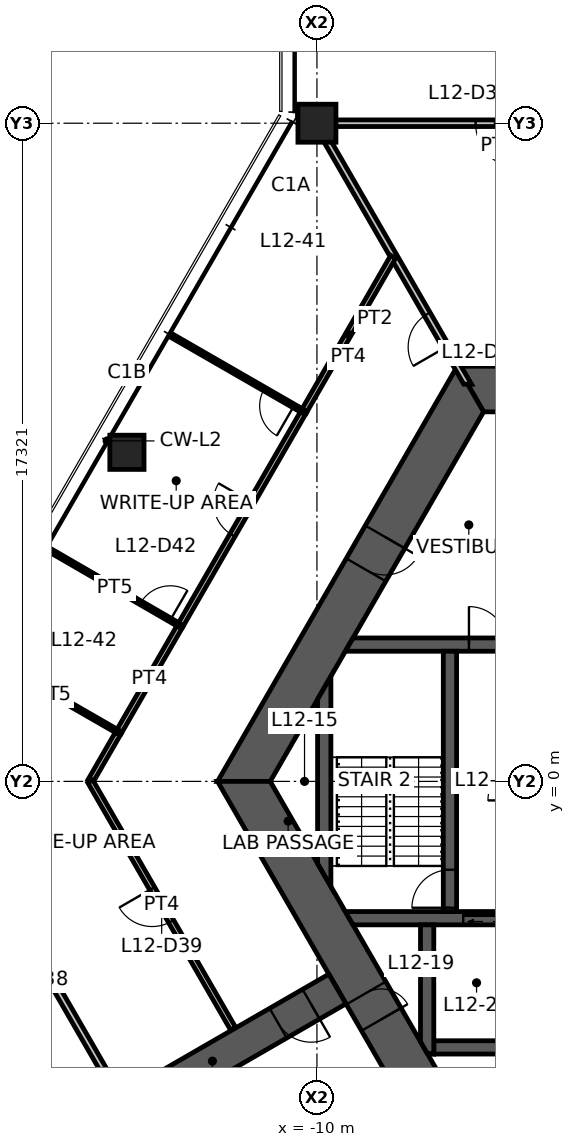
"""IFC4 building model, lengths in metres.
Left out: names, types, materials, properties, quantities, classifications, styles, units other than length and angle.
Written with IfcOpenShell. Run it as: python <this file> out.ifc"""

import sys

from ifc_helpers import new_model, si_unit, direction, frame, frame_2d, origin, origin_2d, place, context, subcontext, project, spatial, polyline, rectangle, hollow_rectangle, outline, extrude, element, fill, save


model = new_model("IFC4")
c1 = context("Model", 3, precision=1e-05, world=origin(), true_north=direction((0.0, 1.0)))
c2 = subcontext(c1, "Body", "Model", "MODEL_VIEW")
j1 = project(units=[si_unit("LENGTHUNIT", "METRE"), si_unit("PLANEANGLEUNIT", "RADIAN")], contexts=[c1])
p1 = place(None, origin())
s1 = spatial("IfcSite", under=j1, at=p1, CompositionType="ELEMENT")
p2 = place(p1, origin())
s2 = spatial("IfcBuilding", under=s1, at=p2, CompositionType="ELEMENT")
p3 = place(p2, frame((0.0, 0.0, 47.8)))
s3 = spatial("IfcBuildingStorey", under=s2, at=p3, CompositionType="ELEMENT", Elevation=47.8)
p4 = place(p3, frame((-10.0, 17.321, 0.0), z_axis=(0.0, 0.0, 1.0), x_axis=(1.0, 0.0, 0.0)))
e1 = element("IfcColumn", 1, at=p4, inside=s3, PredefinedType="COLUMN", context=c2, shape_type="SweptSolid", body=[
    extrude(hollow_rectangle(XDim=1.0, YDim=1.0, WallThickness=0.06, at=origin_2d()), origin(), (0.0, 0.0, 1.0), 4.2),
])
p5 = place(p3, frame((-15.0, 8.66, 0.0), z_axis=(0.0, 0.0, 1.0), x_axis=(1.0, 0.0, 0.0)))
e2 = element("IfcColumn", 2, at=p5, inside=s3, PredefinedType="COLUMN", context=c2, shape_type="SweptSolid", body=[
    extrude(hollow_rectangle(XDim=0.9, YDim=0.9, WallThickness=0.05, at=origin_2d()), origin(), (0.0, 0.0, 1.0), 4.2),
])
p6 = place(p3, frame((5.961, 10.325, 0.0), z_axis=(0.0, 0.0, 1.0), x_axis=(-1.0, 0.0, 0.0)))
e3 = element("IfcWall", 3, at=p6, inside=s3, PredefinedType="SHEAR", context=c2, shape_type="SweptSolid", body=[
    extrude(outline(polyline([(-0.346, -0.6), (4.574, -0.6), (5.474, -0.6), (6.449, -0.6), (7.349, -0.6), (12.269, -0.6), (11.576, 0.6), (7.349, 0.6), (6.449, 0.6), (5.474, 0.6), (4.574, 0.6), (0.346, 0.6), (-0.346, -0.6)])), origin(), (0.0, 0.0, 1.0), 4.2),
])
p7 = place(p6, frame((6.449, 0.0, 0.0)))
e4 = element("IfcOpeningElement", 4, at=p7, cuts=e3, PredefinedType="OPENING", context=c2, shape_type="SweptSolid", body=[
    extrude(rectangle(XDim=0.9, YDim=2.1, at=frame_2d((0.45, 1.05))), frame((0.0, 0.61, 0.0), z_axis=(0.0, -1.0, 0.0), x_axis=(1.0, 0.0, 0.0)), (0.0, 0.0, 1.0), 1.22),
])
p8 = place(p6, frame((4.574, 0.0, 0.0)))
e5 = element("IfcOpeningElement", 5, at=p8, cuts=e3, PredefinedType="OPENING", context=c2, shape_type="SweptSolid", body=[
    extrude(rectangle(XDim=0.9, YDim=2.1, at=frame_2d((0.45, 1.05))), frame((0.0, 0.61, 0.0), z_axis=(0.0, -1.0, 0.0), x_axis=(1.0, 0.0, 0.0)), (0.0, 0.0, 1.0), 1.22),
])
p9 = place(p3, frame((-5.961, 10.325, 0.0), z_axis=(0.0, 0.0, 1.0), x_axis=(-0.500004296715, -0.866022923061, 0.0)))
e6 = element("IfcWall", 6, at=p9, inside=s3, PredefinedType="SHEAR", context=c2, shape_type="SweptSolid", body=[
    extrude(outline(polyline([(-0.346, -0.6), (4.494, -0.6), (5.494, -0.6), (12.269, -0.6), (11.576, 0.6), (5.494, 0.6), (4.494, 0.6), (0.346, 0.6), (-0.346, -0.6)])), origin(), (0.0, 0.0, 1.0), 4.2),
])
p10 = place(p9, frame((4.494, 0.0, 0.0)))
e7 = element("IfcOpeningElement", 7, at=p10, cuts=e6, PredefinedType="OPENING", context=c2, shape_type="SweptSolid", body=[
    extrude(rectangle(XDim=1.0, YDim=2.1, at=frame_2d((0.5, 1.05))), frame((0.0, 0.61, 0.0), z_axis=(0.0, -1.0, 0.0), x_axis=(1.0, 0.0, 0.0)), (0.0, 0.0, 1.0), 1.22),
])
p11 = place(p3, frame((-11.922, 0.0, 0.0), z_axis=(0.0, 0.0, 1.0), x_axis=(0.500004296715, -0.866022923061, 0.0)))
e8 = element("IfcWall", 8, at=p11, inside=s3, PredefinedType="SHEAR", context=c2, shape_type="SweptSolid", body=[
    extrude(outline(polyline([(-0.346, -0.6), (6.431, -0.6), (7.231, -0.6), (12.269, -0.6), (11.576, 0.6), (7.231, 0.6), (6.431, 0.6), (0.346, 0.6), (-0.346, -0.6)])), origin(), (0.0, 0.0, 1.0), 4.2),
])
p12 = place(p11, frame((6.431, 0.0, 0.0)))
e9 = element("IfcOpeningElement", 9, at=p12, cuts=e8, PredefinedType="OPENING", context=c2, shape_type="SweptSolid", body=[
    extrude(rectangle(XDim=0.8, YDim=2.1, at=frame_2d((0.4, 1.05))), frame((0.0, 0.61, 0.0), z_axis=(0.0, -1.0, 0.0), x_axis=(1.0, 0.0, 0.0)), (0.0, 0.0, 1.0), 1.22),
])
p13 = place(p3, frame((-9.461, -5.462, 0.0), z_axis=(0.0, 0.0, 1.0), x_axis=(-0.866019116917, -0.500010889016, 0.0)))
e10 = element("IfcWall", 10, at=p13, inside=s3, PredefinedType="SHEAR", context=c2, shape_type="SweptSolid", body=[
    extrude(rectangle(XDim=7.595, YDim=0.9, at=frame_2d((3.798, 0.0))), origin(), (0.0, 0.0, 1.0), 4.2),
])
p14 = place(p13, frame((0.8, 0.0, 0.0)))
e11 = element("IfcOpeningElement", 11, at=p14, cuts=e10, PredefinedType="OPENING", context=c2, shape_type="SweptSolid", body=[
    extrude(rectangle(XDim=1.0, YDim=2.1, at=frame_2d((0.5, 1.05))), frame((0.0, 0.46, 0.0), z_axis=(0.0, -1.0, 0.0), x_axis=(1.0, 0.0, 0.0)), (0.0, 0.0, 1.0), 0.92),
])
p15 = place(p3, frame((-9.151, 3.6, 0.0), z_axis=(0.0, 0.0, 1.0), x_axis=(1.0, 0.0, 0.0)))
e12 = element("IfcWall", 12, at=p15, inside=s3, PredefinedType="SHEAR", context=c2, shape_type="SweptSolid", body=[
    extrude(outline(polyline([(-0.101, -0.175), (3.151, -0.175), (4.151, -0.175), (7.726, -0.175), (7.726, 0.175), (4.151, 0.175), (3.151, 0.175), (0.101, 0.175), (-0.101, -0.175)])), origin(), (0.0, 0.0, 1.0), 4.2),
])
p16 = place(p15, frame((3.151, 0.0, 0.0)))
e13 = element("IfcOpeningElement", 13, at=p16, cuts=e12, PredefinedType="OPENING", context=c2, shape_type="SweptSolid", body=[
    extrude(rectangle(XDim=1.0, YDim=2.1, at=frame_2d((0.5, 1.05))), frame((0.0, 0.185, 0.0), z_axis=(0.0, -1.0, 0.0), x_axis=(1.0, 0.0, 0.0)), (0.0, 0.0, 1.0), 0.37),
])
p17 = place(p3, frame((-9.151, -3.6, 0.0), z_axis=(0.0, 0.0, 1.0), x_axis=(1.0, 0.0, 0.0)))
e14 = element("IfcWall", 14, at=p17, inside=s3, PredefinedType="SHEAR", context=c2, shape_type="SweptSolid", body=[
    extrude(outline(polyline([(0.101, -0.175), (3.001, -0.175), (4.301, -0.175), (7.726, -0.175), (7.726, 0.175), (4.301, 0.175), (3.001, 0.175), (-0.101, 0.175), (0.101, -0.175)])), origin(), (0.0, 0.0, 1.0), 4.2),
])
p18 = place(p17, frame((3.001, 0.0, 0.0)))
e15 = element("IfcOpeningElement", 15, at=p18, cuts=e14, PredefinedType="OPENING", context=c2, shape_type="SweptSolid", body=[
    extrude(rectangle(XDim=1.3, YDim=2.1, at=frame_2d((0.65, 1.05))), frame((0.0, 0.185, 0.0), z_axis=(0.0, -1.0, 0.0), x_axis=(1.0, 0.0, 0.0)), (0.0, 0.0, 1.0), 0.37),
])
p19 = place(p3, frame((-6.5, -3.425, 0.0), z_axis=(0.0, 0.0, 1.0), x_axis=(0.0, 1.0, 0.0)))
e16 = element("IfcWall", 16, at=p19, inside=s3, PredefinedType="SHEAR", context=c2, shape_type="SweptSolid", body=[
    extrude(rectangle(XDim=6.85, YDim=0.35, at=frame_2d((3.425, 0.0))), origin(), (0.0, 0.0, 1.0), 4.2),
])
p20 = place(p19, frame((0.1, 0.0, 0.0)))
e17 = element("IfcOpeningElement", 17, at=p20, cuts=e16, PredefinedType="OPENING", context=c2, shape_type="SweptSolid", body=[
    extrude(rectangle(XDim=1.0, YDim=2.1, at=frame_2d((0.5, 1.05))), frame((0.0, 0.185, 0.0), z_axis=(0.0, -1.0, 0.0), x_axis=(1.0, 0.0, 0.0)), (0.0, 0.0, 1.0), 0.37),
])
p21 = place(p3, frame((-6.925, -7.0, 0.0), z_axis=(0.0, 0.0, 1.0), x_axis=(1.0, 0.0, 0.0)))
e18 = element("IfcWall", 18, at=p21, inside=s3, PredefinedType="SHEAR", context=c2, shape_type="SweptSolid", body=[
    extrude(rectangle(XDim=2.25, YDim=0.35, at=frame_2d((1.125, 0.0))), origin(), (0.0, 0.0, 1.0), 4.2),
])
p22 = place(p3, frame((-7.1, -3.775, 0.0), z_axis=(0.0, 0.0, 1.0), x_axis=(0.0, -1.0, 0.0)))
e19 = element("IfcWall", 19, at=p22, inside=s3, PredefinedType="SHEAR", context=c2, shape_type="SweptSolid", body=[
    extrude(outline(polyline([(0.0, -0.175), (3.074, -0.175), (3.377, 0.0), (3.4, 0.175), (0.0, 0.175), (0.0, -0.175)])), origin(), (0.0, 0.0, 1.0), 4.2),
])
p23 = place(p3, frame((-9.808, -2.462, 0.0), z_axis=(0.0, 0.0, 1.0), x_axis=(0.0, 1.0, 0.0)))
e20 = element("IfcWall", 20, at=p23, inside=s3, PredefinedType="SHEAR", context=c2, shape_type="SweptSolid", body=[
    extrude(outline(polyline([(-0.303, -0.175), (5.228, -0.175), (4.621, 0.175), (0.303, 0.175), (-0.303, -0.175)])), origin(), (0.0, 0.0, 1.0), 4.2),
])
p24 = place(p3, frame((-6.035, 10.453, 0.0), z_axis=(0.0, 0.0, 1.0), x_axis=(-0.499993402427, 0.866029212861, 0.0)))
e21 = element("IfcWall", 21, at=p24, inside=s3, PredefinedType="PARTITIONING", context=c2, shape_type="SweptSolid", body=[
    extrude(outline(polyline([(-0.051, -0.087), (1.129, -0.087), (2.129, -0.087), (7.93, -0.087), (7.93, 0.087), (2.129, 0.087), (1.129, 0.087), (0.051, 0.087), (-0.051, -0.087)])), origin(), (0.0, 0.0, 1.0), 3.05),
])
p25 = place(p24, frame((1.129, 0.0, 0.0)))
e22 = element("IfcOpeningElement", 22, at=p25, cuts=e21, PredefinedType="OPENING", context=c2, shape_type="SweptSolid", body=[
    extrude(rectangle(XDim=1.0, YDim=2.1, at=frame_2d((0.5, 1.05))), frame((0.0, 0.098, 0.0), z_axis=(0.0, -1.0, 0.0), x_axis=(1.0, 0.0, 0.0)), (0.0, 0.0, 1.0), 0.195),
])
p26 = place(p3, frame((-0.45, 17.321, 0.0), z_axis=(0.0, 0.0, 1.0), x_axis=(-1.0, 0.0, 0.0)))
e23 = element("IfcWall", 23, at=p26, inside=s3, PredefinedType="PARTITIONING", context=c2, shape_type="SweptSolid", body=[
    extrude(rectangle(XDim=9.55, YDim=0.175, at=frame_2d((4.775, 0.0))), origin(), (0.0, 0.0, 1.0), 2.95),
])
p27 = place(p26, frame((4.175, 0.0, 0.0)))
e24 = element("IfcOpeningElement", 24, at=p27, cuts=e23, PredefinedType="OPENING", context=c2, shape_type="SweptSolid", body=[
    extrude(rectangle(XDim=1.2, YDim=2.1, at=frame_2d((0.6, 1.05))), frame((0.0, 0.098, 0.0), z_axis=(0.0, -1.0, 0.0), x_axis=(1.0, 0.0, 0.0)), (0.0, 0.0, 1.0), 0.195),
])
p28 = place(p3, frame((-15.225, -8.271, 0.0), z_axis=(0.0, 0.0, 1.0), x_axis=(-0.499993908199, 0.866028920859, 0.0)))
e25 = element("IfcWall", 25, at=p28, inside=s3, PredefinedType="PARTITIONING", context=c2, shape_type="SweptSolid", body=[
    extrude(rectangle(XDim=9.55, YDim=0.175, at=frame_2d((4.775, 0.0))), origin(), (0.0, 0.0, 1.0), 2.95),
])
p29 = place(p28, frame((4.175, 0.0, 0.0)))
e26 = element("IfcOpeningElement", 26, at=p29, cuts=e25, PredefinedType="OPENING", context=c2, shape_type="SweptSolid", body=[
    extrude(rectangle(XDim=1.2, YDim=2.1, at=frame_2d((0.6, 1.05))), frame((0.0, 0.098, 0.0), z_axis=(0.0, -1.0, 0.0), x_axis=(1.0, 0.0, 0.0)), (0.0, 0.0, 1.0), 0.195),
])
p30 = place(p3, frame((-10.352, 9.719, 0.0), z_axis=(0.0, 0.0, 1.0), x_axis=(0.499985273446, 0.866033905998, 0.0)))
e27 = element("IfcWall", 27, at=p30, inside=s3, PredefinedType="PARTITIONING", context=c2, shape_type="SweptSolid", body=[
    extrude(rectangle(XDim=4.718, YDim=0.15, at=frame_2d((2.359, 0.0))), origin(), (0.0, 0.0, 1.0), 2.65),
])
p31 = place(p3, frame((-15.222, 1.285, 0.0), z_axis=(0.0, 0.0, 1.0), x_axis=(0.499969057507, 0.866043267704, 0.0)))
e28 = element("IfcWall", 28, at=p31, inside=s3, PredefinedType="PARTITIONING", context=c2, shape_type="SweptSolid", body=[
    extrude(rectangle(XDim=3.257, YDim=0.15, at=frame_2d((1.628, 0.0))), origin(), (0.0, 0.0, 1.0), 2.65),
])
p32 = place(p3, frame((-15.964, 0.0, 0.0), z_axis=(0.0, 0.0, 1.0), x_axis=(0.499901701094, 0.866082149246, 0.0)))
e29 = element("IfcWall", 29, at=p32, inside=s3, PredefinedType="PARTITIONING", context=c2, shape_type="SweptSolid", body=[
    extrude(rectangle(XDim=1.493, YDim=0.15, at=frame_2d((0.747, 0.0))), origin(), (0.0, 0.0, 1.0), 2.65),
])
p33 = place(p3, frame((-12.208, -6.506, 0.0), z_axis=(0.0, 0.0, 1.0), x_axis=(-0.499984092097, 0.866034588021, 0.0)))
e30 = element("IfcWall", 30, at=p33, inside=s3, PredefinedType="PARTITIONING", context=c2, shape_type="SweptSolid", body=[
    extrude(rectangle(XDim=7.512, YDim=0.15, at=frame_2d((3.756, 0.0))), origin(), (0.0, 0.0, 1.0), 2.65),
])
p34 = place(p33, frame((3.256, 0.0, 0.0)))
e31 = element("IfcOpeningElement", 31, at=p34, cuts=e30, PredefinedType="OPENING", context=c2, shape_type="SweptSolid", body=[
    extrude(rectangle(XDim=1.0, YDim=2.1, at=frame_2d((0.5, 1.05))), frame((0.0, 0.085, 0.0), z_axis=(0.0, -1.0, 0.0), x_axis=(1.0, 0.0, 0.0)), (0.0, 0.0, 1.0), 0.17),
])
p35 = place(p3, frame((-13.598, 4.097, 0.0), z_axis=(0.0, 0.0, 1.0), x_axis=(0.49998791073, 0.866032383415, 0.0)))
e32 = element("IfcWall", 32, at=p35, inside=s3, PredefinedType="PARTITIONING", context=c2, shape_type="SweptSolid", body=[
    extrude(rectangle(XDim=6.502, YDim=0.15, at=frame_2d((3.251, 0.0))), origin(), (0.0, 0.0, 1.0), 2.65),
])
p36 = place(p35, frame((2.751, 0.0, 0.0)))
e33 = element("IfcOpeningElement", 33, at=p36, cuts=e32, PredefinedType="OPENING", context=c2, shape_type="SweptSolid", body=[
    extrude(rectangle(XDim=1.0, YDim=2.1, at=frame_2d((0.5, 1.05))), frame((0.0, 0.085, 0.0), z_axis=(0.0, -1.0, 0.0), x_axis=(1.0, 0.0, 0.0)), (0.0, 0.0, 1.0), 0.17),
])
p37 = place(p3, frame((-10.347, 9.728, 0.0), z_axis=(0.0, 0.0, 1.0), x_axis=(-0.866583023507, 0.499032928142, 0.0)))
e34 = element("IfcWall", 34, at=p37, inside=s3, PredefinedType="PARTITIONING", context=c2, shape_type="SweptSolid", body=[
    extrude(rectangle(XDim=3.975, YDim=0.1, at=frame_2d((1.988, 0.0))), origin(), (0.0, 0.0, 1.0), 2.65),
])
p38 = place(p37, frame((0.3, 0.0, 0.0)))
e35 = element("IfcOpeningElement", 35, at=p38, cuts=e34, PredefinedType="OPENING", context=c2, shape_type="SweptSolid", body=[
    extrude(rectangle(XDim=0.9, YDim=2.1, at=frame_2d((0.45, 1.05))), frame((0.0, 0.06, 0.0), z_axis=(0.0, -1.0, 0.0), x_axis=(1.0, 0.0, 0.0)), (0.0, 0.0, 1.0), 0.12),
])
p39 = place(p3, frame((-15.217, 1.293, 0.0), z_axis=(0.0, 0.0, 1.0), x_axis=(-0.866583023507, 0.499032928142, 0.0)))
e36 = element("IfcWall", 36, at=p39, inside=s3, PredefinedType="PARTITIONING", context=c2, shape_type="SweptSolid", body=[
    extrude(rectangle(XDim=3.975, YDim=0.1, at=frame_2d((1.988, 0.0))), origin(), (0.0, 0.0, 1.0), 2.65),
])
p40 = place(p3, frame((-17.039, 6.089, 0.0), z_axis=(0.0, 0.0, 1.0), x_axis=(0.865455715078, -0.500985434159, 0.0)))
e37 = element("IfcWall", 37, at=p40, inside=s3, PredefinedType="PARTITIONING", context=c2, shape_type="SweptSolid", body=[
    extrude(rectangle(XDim=3.976, YDim=0.1, at=frame_2d((1.988, 0.0))), origin(), (0.0, 0.0, 1.0), 2.65),
])
p41 = place(p40, frame((2.776, 0.0, 0.0)))
e38 = element("IfcOpeningElement", 38, at=p41, cuts=e37, PredefinedType="OPENING", context=c2, shape_type="SweptSolid", body=[
    extrude(rectangle(XDim=0.9, YDim=2.1, at=frame_2d((0.45, 1.05))), frame((0.0, 0.06, 0.0), z_axis=(0.0, -1.0, 0.0), x_axis=(1.0, 0.0, 0.0)), (0.0, 0.0, 1.0), 0.12),
])
p42 = place(p12, origin())
e39 = element("IfcDoor", 39, at=p42, inside=s3, OperationType="SINGLE_SWING_RIGHT", PredefinedType="DOOR", context=c2, shape_type="SweptSolid", body=[
    extrude(rectangle(XDim=0.8, YDim=2.1, at=frame_2d((0.4, 1.05))), frame((0.0, 0.025, 0.0), z_axis=(0.0, -1.0, 0.0), x_axis=(1.0, 0.0, 0.0)), (0.0, 0.0, 1.0), 0.05),
])
fill(e9, e39)
p43 = place(p10, origin())
e40 = element("IfcDoor", 40, at=p43, inside=s3, OperationType="SINGLE_SWING_LEFT", PredefinedType="DOOR", context=c2, shape_type="SweptSolid", body=[
    extrude(rectangle(XDim=1.0, YDim=2.1, at=frame_2d((0.5, 1.05))), frame((0.0, 0.025, 0.0), z_axis=(0.0, -1.0, 0.0), x_axis=(1.0, 0.0, 0.0)), (0.0, 0.0, 1.0), 0.05),
])
fill(e7, e40)
p44 = place(p20, origin())
e41 = element("IfcDoor", 41, at=p44, inside=s3, OperationType="SINGLE_SWING_LEFT", PredefinedType="DOOR", context=c2, shape_type="SweptSolid", body=[
    extrude(rectangle(XDim=1.0, YDim=2.1, at=frame_2d((0.5, 1.05))), frame((0.0, 0.025, 0.0), z_axis=(0.0, -1.0, 0.0), x_axis=(1.0, 0.0, 0.0)), (0.0, 0.0, 1.0), 0.05),
])
fill(e17, e41)
p45 = place(p16, origin())
e42 = element("IfcDoor", 42, at=p45, inside=s3, OperationType="SINGLE_SWING_LEFT", PredefinedType="DOOR", context=c2, shape_type="SweptSolid", body=[
    extrude(rectangle(XDim=1.0, YDim=2.1, at=frame_2d((0.5, 1.05))), frame((0.0, 0.025, 0.0), z_axis=(0.0, -1.0, 0.0), x_axis=(1.0, 0.0, 0.0)), (0.0, 0.0, 1.0), 0.05),
])
fill(e13, e42)
p46 = place(p14, origin())
e43 = element("IfcDoor", 43, at=p46, inside=s3, OperationType="SINGLE_SWING_LEFT", PredefinedType="DOOR", context=c2, shape_type="SweptSolid", body=[
    extrude(rectangle(XDim=1.0, YDim=2.1, at=frame_2d((0.5, 1.05))), frame((0.0, 0.025, 0.0), z_axis=(0.0, -1.0, 0.0), x_axis=(1.0, 0.0, 0.0)), (0.0, 0.0, 1.0), 0.05),
])
fill(e11, e43)
p47 = place(p25, origin())
e44 = element("IfcDoor", 44, at=p47, inside=s3, OperationType="SINGLE_SWING_LEFT", PredefinedType="DOOR", context=c2, shape_type="SweptSolid", body=[
    extrude(rectangle(XDim=1.0, YDim=2.1, at=frame_2d((0.5, 1.05))), frame((0.0, 0.025, 0.0), z_axis=(0.0, -1.0, 0.0), x_axis=(1.0, 0.0, 0.0)), (0.0, 0.0, 1.0), 0.05),
])
fill(e22, e44)
p48 = place(p27, origin())
e45 = element("IfcDoor", 45, at=p48, inside=s3, OperationType="DOUBLE_DOOR_SINGLE_SWING", PredefinedType="DOOR", context=c2, shape_type="SweptSolid", body=[
    extrude(rectangle(XDim=1.2, YDim=2.1, at=frame_2d((0.6, 1.05))), frame((0.0, 0.025, 0.0), z_axis=(0.0, -1.0, 0.0), x_axis=(1.0, 0.0, 0.0)), (0.0, 0.0, 1.0), 0.05),
])
fill(e24, e45)
p49 = place(p34, origin())
e46 = element("IfcDoor", 46, at=p49, inside=s3, OperationType="SINGLE_SWING_RIGHT", PredefinedType="DOOR", context=c2, shape_type="SweptSolid", body=[
    extrude(rectangle(XDim=1.0, YDim=2.1, at=frame_2d((0.5, 1.05))), frame((0.0, 0.025, 0.0), z_axis=(0.0, -1.0, 0.0), x_axis=(1.0, 0.0, 0.0)), (0.0, 0.0, 1.0), 0.05),
])
fill(e31, e46)
p50 = place(p36, origin())
e47 = element("IfcDoor", 47, at=p50, inside=s3, OperationType="SINGLE_SWING_RIGHT", PredefinedType="DOOR", context=c2, shape_type="SweptSolid", body=[
    extrude(rectangle(XDim=1.0, YDim=2.1, at=frame_2d((0.5, 1.05))), frame((0.0, 0.025, 0.0), z_axis=(0.0, -1.0, 0.0), x_axis=(1.0, 0.0, 0.0)), (0.0, 0.0, 1.0), 0.05),
])
fill(e33, e47)
p51 = place(p38, origin())
e48 = element("IfcDoor", 48, at=p51, inside=s3, OperationType="SINGLE_SWING_LEFT", PredefinedType="DOOR", context=c2, shape_type="SweptSolid", body=[
    extrude(rectangle(XDim=0.9, YDim=2.1, at=frame_2d((0.45, 1.05))), frame((0.0, 0.025, 0.0), z_axis=(0.0, -1.0, 0.0), x_axis=(1.0, 0.0, 0.0)), (0.0, 0.0, 1.0), 0.05),
])
fill(e35, e48)
p52 = place(p41, origin())
e49 = element("IfcDoor", 49, at=p52, inside=s3, OperationType="SINGLE_SWING_RIGHT", PredefinedType="DOOR", context=c2, shape_type="SweptSolid", body=[
    extrude(rectangle(XDim=0.9, YDim=2.1, at=frame_2d((0.45, 1.05))), frame((0.0, 0.025, 0.0), z_axis=(0.0, -1.0, 0.0), x_axis=(1.0, 0.0, 0.0)), (0.0, 0.0, 1.0), 0.05),
])
fill(e38, e49)
p53 = place(p18, origin())
e50 = element("IfcDoor", 50, at=p53, inside=s3, OperationType="DOUBLE_DOOR_SLIDING", PredefinedType="DOOR", context=c2, shape_type="SweptSolid", body=[
    extrude(rectangle(XDim=1.3, YDim=2.1, at=frame_2d((0.65, 1.05))), frame((0.0, 0.025, 0.0), z_axis=(0.0, -1.0, 0.0), x_axis=(1.0, 0.0, 0.0)), (0.0, 0.0, 1.0), 0.05),
])
fill(e15, e50)
save(model, sys.argv[1])
